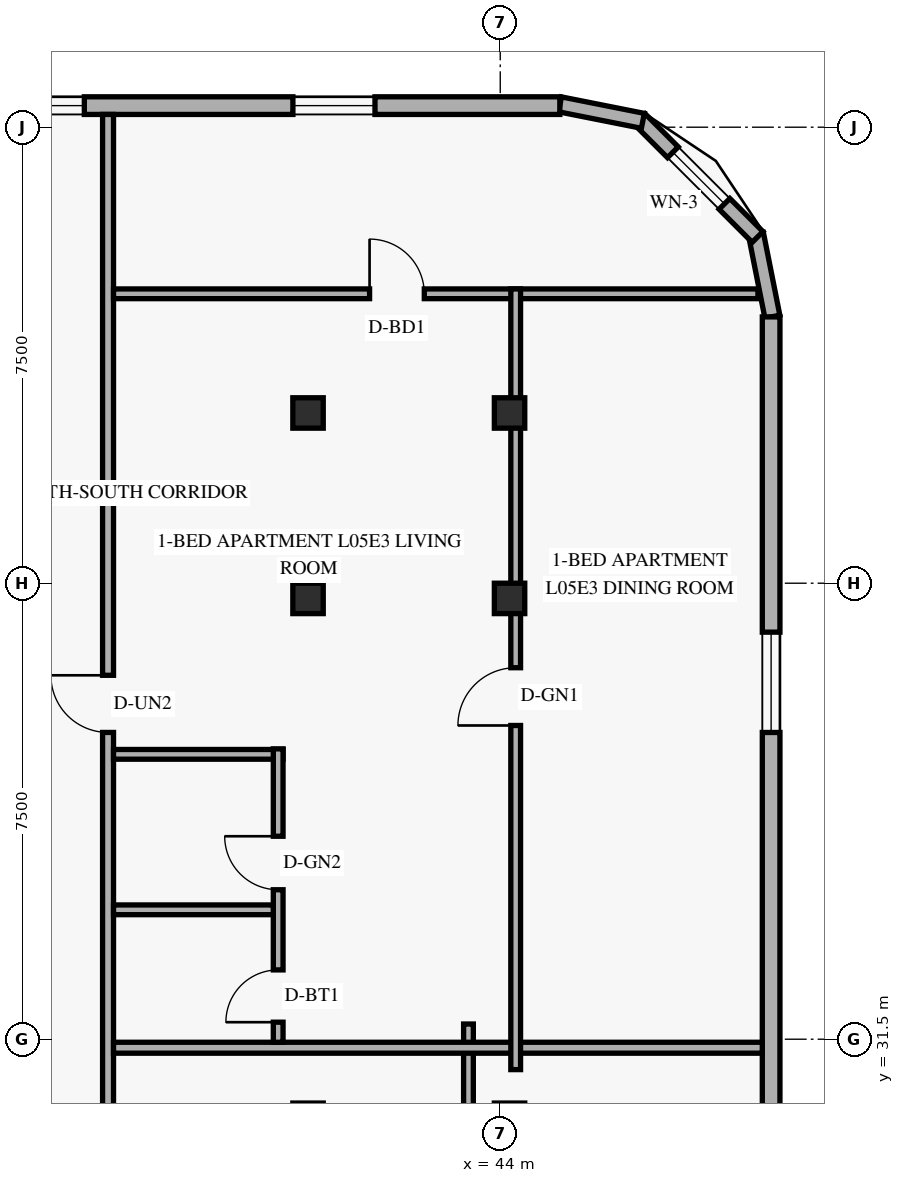
"""IFC4 building model, lengths in metres.
Left out: names, types, materials, properties, quantities, classifications, styles, units other than length and angle.
Written with IfcOpenShell. Run it as: python <this file> out.ifc"""

import sys

from ifc_helpers import new_model, si_unit, direction, frame, frame_2d, origin, origin_2d, place, context, subcontext, project, spatial, rectangle, hollow_rectangle, extrude, element, fill, save


model = new_model("IFC4")
c1 = context("Model", 3, precision=1e-05, world=origin(), true_north=direction((0.0, 1.0)))
c2 = subcontext(c1, "Body", "Model", "MODEL_VIEW")
j1 = project(units=[si_unit("LENGTHUNIT", "METRE"), si_unit("PLANEANGLEUNIT", "RADIAN")], contexts=[c1])
p1 = place(None, origin())
s1 = spatial("IfcSite", under=j1, at=p1, CompositionType="ELEMENT")
p2 = place(p1, origin())
s2 = spatial("IfcBuilding", under=s1, at=p2, CompositionType="ELEMENT")
p3 = place(p2, frame((0.0, 0.0, 24.0)))
s3 = spatial("IfcBuildingStorey", under=s2, at=p3, CompositionType="ELEMENT", Elevation=24.0)
for number, where, z_axis, x_axis in (
    (1, (40.776, 38.75, 0.0), (0.035, 0.0, 0.999), (0.0, 1.0, 0.0)),
    (2, (40.776, 41.8, 0.0), (0.035, 0.0, 0.999), (0.0, 1.0, 0.0)),
):
    element("IfcColumn", number, at=place(p3, frame(where, z_axis=z_axis, x_axis=x_axis)), inside=s3, PredefinedType="COLUMN", context=c2, shape_type="SweptSolid", body=[
        extrude(hollow_rectangle(XDim=0.5, YDim=0.5, WallThickness=0.022, at=origin_2d()), origin(), (0.0, 0.0, 1.0), 3.602),
    ])
for number, where, z_axis, x_axis in (
    (3, (44.049, 38.75, 0.0), (0.058, 0.0, 0.998), (0.0, 1.0, 0.0)),
    (4, (44.049, 41.8, 0.0), (0.058, 0.0, 0.998), (0.0, 1.0, 0.0)),
):
    element("IfcColumn", number, at=place(p3, frame(where, z_axis=z_axis, x_axis=x_axis)), inside=s3, PredefinedType="COLUMN", context=c2, shape_type="SweptSolid", body=[
        extrude(hollow_rectangle(XDim=0.5, YDim=0.5, WallThickness=0.022, at=origin_2d()), origin(), (0.0, 0.0, 1.0), 3.606),
    ])
p4 = place(p3, frame((48.476, 43.384, 0.0), z_axis=(0.0, 0.0, 1.0), x_axis=(-0.19496651342, 0.980809899341, 0.0)))
e5 = element("IfcWall", 5, at=p4, inside=s3, PredefinedType="SOLIDWALL", context=c2, shape_type="SweptSolid", body=[
    extrude(rectangle(XDim=1.389, YDim=0.25, at=frame_2d((0.694, 0.0))), origin(), (0.0, 0.0, 1.0), 3.36),
])
p5 = place(p3, frame((48.232, 44.695, 0.0), z_axis=(0.0, 0.0, 1.0), x_axis=(-0.707106781187, 0.707106781187, 0.0)))
e6 = element("IfcWall", 6, at=p5, inside=s3, PredefinedType="SOLIDWALL", context=c2, shape_type="SweptSolid", body=[
    extrude(rectangle(XDim=2.739, YDim=0.25, at=frame_2d((1.37, 0.0))), origin(), (0.0, 0.0, 1.0), 3.36),
])
p6 = place(p5, frame((0.77, 0.0, 0.85)))
e7 = element("IfcOpeningElement", 7, at=p6, cuts=e6, PredefinedType="OPENING", context=c2, shape_type="SweptSolid", body=[
    extrude(rectangle(XDim=1.2, YDim=1.5, at=frame_2d((0.6, 0.75))), frame((0.0, 0.135, 0.0), z_axis=(0.0, -1.0, 0.0), x_axis=(1.0, 0.0, 0.0)), (0.0, 0.0, 1.0), 0.27),
])
p7 = place(p3, frame((46.345, 46.605, 0.0), z_axis=(0.0, 0.0, 1.0), x_axis=(-0.980809899341, 0.19496651342, 0.0)))
e8 = element("IfcWall", 8, at=p7, inside=s3, PredefinedType="SOLIDWALL", context=c2, shape_type="SweptSolid", body=[
    extrude(rectangle(XDim=1.389, YDim=0.25, at=frame_2d((0.694, 0.0))), origin(), (0.0, 0.0, 1.0), 3.36),
])
p8 = place(p3, frame((48.455, 4.62, 0.0), z_axis=(0.0, 0.0, 1.0), x_axis=(0.0, 1.0, 0.0)))
e9 = element("IfcWall", 9, at=p8, inside=s3, PredefinedType="SOLIDWALL", context=c2, shape_type="SweptSolid", body=[
    extrude(rectangle(XDim=38.76, YDim=0.29, at=frame_2d((19.38, 0.0))), origin(), (0.0, 0.0, 1.0), 3.36),
])
p9 = place(p8, frame((4.725, 0.0, 0.85)))
e10 = element("IfcOpeningElement", 10, at=p9, cuts=e9, PredefinedType="OPENING", context=c2, shape_type="SweptSolid", body=[
    extrude(rectangle(XDim=1.65, YDim=1.6, at=frame_2d((0.825, 0.8))), frame((0.0, 0.155, 0.0), z_axis=(0.0, -1.0, 0.0), x_axis=(1.0, 0.0, 0.0)), (0.0, 0.0, 1.0), 0.31),
])
p10 = place(p8, frame((12.429, 0.0, 0.85)))
e11 = element("IfcOpeningElement", 11, at=p10, cuts=e9, PredefinedType="OPENING", context=c2, shape_type="SweptSolid", body=[
    extrude(rectangle(XDim=1.65, YDim=1.6, at=frame_2d((0.825, 0.8))), frame((0.0, 0.155, 0.0), z_axis=(0.0, -1.0, 0.0), x_axis=(1.0, 0.0, 0.0)), (0.0, 0.0, 1.0), 0.31),
])
p11 = place(p8, frame((18.254, 0.0, 0.85)))
e12 = element("IfcOpeningElement", 12, at=p11, cuts=e9, PredefinedType="OPENING", context=c2, shape_type="SweptSolid", body=[
    extrude(rectangle(XDim=1.65, YDim=1.6, at=frame_2d((0.825, 0.8))), frame((0.0, 0.155, 0.0), z_axis=(0.0, -1.0, 0.0), x_axis=(1.0, 0.0, 0.0)), (0.0, 0.0, 1.0), 0.31),
])
p12 = place(p8, frame((23.92, 0.0, 0.85)))
e13 = element("IfcOpeningElement", 13, at=p12, cuts=e9, PredefinedType="OPENING", context=c2, shape_type="SweptSolid", body=[
    extrude(rectangle(XDim=1.65, YDim=1.6, at=frame_2d((0.825, 0.8))), frame((0.0, 0.155, 0.0), z_axis=(0.0, -1.0, 0.0), x_axis=(1.0, 0.0, 0.0)), (0.0, 0.0, 1.0), 0.31),
])
p13 = place(p8, frame((31.925, 0.0, 0.85)))
e14 = element("IfcOpeningElement", 14, at=p13, cuts=e9, PredefinedType="OPENING", context=c2, shape_type="SweptSolid", body=[
    extrude(rectangle(XDim=1.65, YDim=1.6, at=frame_2d((0.825, 0.8))), frame((0.0, 0.155, 0.0), z_axis=(0.0, -1.0, 0.0), x_axis=(1.0, 0.0, 0.0)), (0.0, 0.0, 1.0), 0.31),
])
p14 = place(p3, frame((44.98, 46.855, 0.0), z_axis=(0.0, 0.0, 1.0), x_axis=(-1.0, 0.0, 0.0)))
e15 = element("IfcWall", 15, at=p14, inside=s3, PredefinedType="SOLIDWALL", context=c2, shape_type="SweptSolid", body=[
    extrude(rectangle(XDim=39.56, YDim=0.29, at=frame_2d((19.78, 0.0))), origin(), (0.0, 0.0, 1.0), 3.36),
])
p15 = place(p14, frame((35.445, 0.0, 0.85)))
e16 = element("IfcOpeningElement", 16, at=p15, cuts=e15, PredefinedType="OPENING", context=c2, shape_type="SweptSolid", body=[
    extrude(rectangle(XDim=1.35, YDim=1.55, at=frame_2d((0.675, 0.775))), frame((0.0, 0.155, 0.0), z_axis=(0.0, -1.0, 0.0), x_axis=(1.0, 0.0, 0.0)), (0.0, 0.0, 1.0), 0.31),
])
p16 = place(p14, frame((31.18, 0.0, 0.85)))
e17 = element("IfcOpeningElement", 17, at=p16, cuts=e15, PredefinedType="OPENING", context=c2, shape_type="SweptSolid", body=[
    extrude(rectangle(XDim=1.2, YDim=1.5, at=frame_2d((0.6, 0.75))), frame((0.0, 0.155, 0.0), z_axis=(0.0, -1.0, 0.0), x_axis=(1.0, 0.0, 0.0)), (0.0, 0.0, 1.0), 0.31),
])
p17 = place(p14, frame((26.85, 0.0, 0.85)))
e18 = element("IfcOpeningElement", 18, at=p17, cuts=e15, PredefinedType="OPENING", context=c2, shape_type="SweptSolid", body=[
    extrude(rectangle(XDim=1.35, YDim=1.55, at=frame_2d((0.675, 0.775))), frame((0.0, 0.155, 0.0), z_axis=(0.0, -1.0, 0.0), x_axis=(1.0, 0.0, 0.0)), (0.0, 0.0, 1.0), 0.31),
])
p18 = place(p14, frame((21.425, 0.0, 0.85)))
e19 = element("IfcOpeningElement", 19, at=p18, cuts=e15, PredefinedType="OPENING", context=c2, shape_type="SweptSolid", body=[
    extrude(rectangle(XDim=1.35, YDim=1.55, at=frame_2d((0.675, 0.775))), frame((0.0, 0.155, 0.0), z_axis=(0.0, -1.0, 0.0), x_axis=(1.0, 0.0, 0.0)), (0.0, 0.0, 1.0), 0.31),
])
p19 = place(p14, frame((16.19, 0.0, 0.85)))
e20 = element("IfcOpeningElement", 20, at=p19, cuts=e15, PredefinedType="OPENING", context=c2, shape_type="SweptSolid", body=[
    extrude(rectangle(XDim=1.35, YDim=1.55, at=frame_2d((0.675, 0.775))), frame((0.0, 0.155, 0.0), z_axis=(0.0, -1.0, 0.0), x_axis=(1.0, 0.0, 0.0)), (0.0, 0.0, 1.0), 0.31),
])
p20 = place(p14, frame((10.955, 0.0, 0.85)))
e21 = element("IfcOpeningElement", 21, at=p20, cuts=e15, PredefinedType="OPENING", context=c2, shape_type="SweptSolid", body=[
    extrude(rectangle(XDim=1.35, YDim=1.55, at=frame_2d((0.675, 0.775))), frame((0.0, 0.155, 0.0), z_axis=(0.0, -1.0, 0.0), x_axis=(1.0, 0.0, 0.0)), (0.0, 0.0, 1.0), 0.31),
])
p21 = place(p14, frame((7.82, 0.0, 0.85)))
e22 = element("IfcOpeningElement", 22, at=p21, cuts=e15, PredefinedType="OPENING", context=c2, shape_type="SweptSolid", body=[
    extrude(rectangle(XDim=1.35, YDim=1.55, at=frame_2d((0.675, 0.775))), frame((0.0, 0.155, 0.0), z_axis=(0.0, -1.0, 0.0), x_axis=(1.0, 0.0, 0.0)), (0.0, 0.0, 1.0), 0.31),
])
p22 = place(p14, frame((3.04, 0.0, 0.85)))
e23 = element("IfcOpeningElement", 23, at=p22, cuts=e15, PredefinedType="OPENING", context=c2, shape_type="SweptSolid", body=[
    extrude(rectangle(XDim=1.35, YDim=1.55, at=frame_2d((0.675, 0.775))), frame((0.0, 0.155, 0.0), z_axis=(0.0, -1.0, 0.0), x_axis=(1.0, 0.0, 0.0)), (0.0, 0.0, 1.0), 0.31),
])
p23 = place(p3, frame((37.55, 1.29, 0.0), z_axis=(0.0, 0.0, 1.0), x_axis=(0.0, 1.0, 0.0)))
e24 = element("IfcWall", 24, at=p23, inside=s3, PredefinedType="STANDARD", context=c2, shape_type="SweptSolid", body=[
    extrude(rectangle(XDim=45.42, YDim=0.18, at=frame_2d((22.71, 0.0))), origin(), (0.0, 0.0, 1.0), 2.649),
])
p24 = place(p23, frame((8.49, 0.0, 0.0)))
e25 = element("IfcOpeningElement", 25, at=p24, cuts=e24, PredefinedType="OPENING", context=c2, shape_type="SweptSolid", body=[
    extrude(rectangle(XDim=0.94, YDim=2.15, at=frame_2d((0.47, 1.075))), frame((0.0, 0.1, 0.0), z_axis=(0.0, -1.0, 0.0), x_axis=(1.0, 0.0, 0.0)), (0.0, 0.0, 1.0), 0.2),
])
p25 = place(p23, frame((20.073, 0.0, 0.0)))
e26 = element("IfcOpeningElement", 26, at=p25, cuts=e24, PredefinedType="OPENING", context=c2, shape_type="SweptSolid", body=[
    extrude(rectangle(XDim=0.94, YDim=2.15, at=frame_2d((0.47, 1.075))), frame((0.0, 0.1, 0.0), z_axis=(0.0, -1.0, 0.0), x_axis=(1.0, 0.0, 0.0)), (0.0, 0.0, 1.0), 0.2),
])
p26 = place(p23, frame((35.256, 0.0, 0.0)))
e27 = element("IfcOpeningElement", 27, at=p26, cuts=e24, PredefinedType="OPENING", context=c2, shape_type="SweptSolid", body=[
    extrude(rectangle(XDim=0.94, YDim=2.15, at=frame_2d((0.47, 1.075))), frame((0.0, 0.1, 0.0), z_axis=(0.0, -1.0, 0.0), x_axis=(1.0, 0.0, 0.0)), (0.0, 0.0, 1.0), 0.2),
])
p27 = place(p3, frame((43.477, 27.29, 0.0), z_axis=(0.0, 0.0, 1.0), x_axis=(0.0, 1.0, 0.0)))
e28 = element("IfcWall", 28, at=p27, inside=s3, PredefinedType="PARTITIONING", context=c2, shape_type="SweptSolid", body=[
    extrude(rectangle(XDim=4.46, YDim=0.16, at=frame_2d((2.23, 0.0))), origin(), (0.0, 0.0, 1.0), 2.649),
])
p28 = place(p3, frame((37.64, 31.36, 0.0), z_axis=(0.0, 0.0, 1.0), x_axis=(1.0, 0.0, 0.0)))
e29 = element("IfcWall", 29, at=p28, inside=s3, PredefinedType="PARTITIONING", context=c2, shape_type="SweptSolid", body=[
    extrude(rectangle(XDim=10.67, YDim=0.18, at=frame_2d((5.335, 0.0))), origin(), (0.0, 0.0, 1.0), 2.649),
])
p29 = place(p3, frame((37.64, 43.76, 0.0), z_axis=(0.0, 0.0, 1.0), x_axis=(1.0, 0.0, 0.0)))
e30 = element("IfcWall", 30, at=p29, inside=s3, PredefinedType="PARTITIONING", context=c2, shape_type="SweptSolid", body=[
    extrude(rectangle(XDim=10.598, YDim=0.16, at=frame_2d((5.299, 0.0))), origin(), (0.0, 0.0, 1.0), 3.36),
])
p30 = place(p29, frame((4.211, 0.0, 0.0)))
e31 = element("IfcOpeningElement", 31, at=p30, cuts=e30, PredefinedType="OPENING", context=c2, shape_type="SweptSolid", body=[
    extrude(rectangle(XDim=0.9, YDim=2.14, at=frame_2d((0.45, 1.07))), frame((0.0, 0.09, 0.0), z_axis=(0.0, -1.0, 0.0), x_axis=(1.0, 0.0, 0.0)), (0.0, 0.0, 1.0), 0.18),
])
p31 = place(p3, frame((37.64, 36.186, 0.0), z_axis=(0.0, 0.0, 1.0), x_axis=(1.0, 0.0, 0.0)))
e32 = element("IfcWall", 32, at=p31, inside=s3, PredefinedType="PLUMBINGWALL", context=c2, shape_type="SweptSolid", body=[
    extrude(rectangle(XDim=2.788, YDim=0.16, at=frame_2d((1.394, 0.0))), origin(), (0.0, 0.0, 1.0), 3.36),
])
p32 = place(p3, frame((40.348, 31.45, 0.0), z_axis=(0.0, 0.0, 1.0), x_axis=(0.0, 1.0, 0.0)))
e33 = element("IfcWall", 33, at=p32, inside=s3, PredefinedType="PLUMBINGWALL", context=c2, shape_type="SweptSolid", body=[
    extrude(rectangle(XDim=4.825, YDim=0.16, at=frame_2d((2.413, 0.0))), origin(), (0.0, 0.0, 1.0), 2.932),
])
p33 = place(p32, frame((0.33, 0.0, 0.0)))
e34 = element("IfcOpeningElement", 34, at=p33, cuts=e33, PredefinedType="OPENING", context=c2, shape_type="SweptSolid", body=[
    extrude(rectangle(XDim=0.86, YDim=2.12, at=frame_2d((0.43, 1.06))), frame((0.0, 0.09, 0.0), z_axis=(0.0, -1.0, 0.0), x_axis=(1.0, 0.0, 0.0)), (0.0, 0.0, 1.0), 0.18),
])
p34 = place(p32, frame((2.508, 0.0, 0.0)))
e35 = element("IfcOpeningElement", 35, at=p34, cuts=e33, PredefinedType="OPENING", context=c2, shape_type="SweptSolid", body=[
    extrude(rectangle(XDim=0.88, YDim=2.12, at=frame_2d((0.44, 1.06))), frame((0.0, 0.09, 0.0), z_axis=(0.0, -1.0, 0.0), x_axis=(1.0, 0.0, 0.0)), (0.0, 0.0, 1.0), 0.18),
])
p35 = place(p3, frame((37.64, 33.628, 0.0), z_axis=(0.0, 0.0, 1.0), x_axis=(1.0, 0.0, 0.0)))
e36 = element("IfcWall", 36, at=p35, inside=s3, PredefinedType="PLUMBINGWALL", context=c2, shape_type="SweptSolid", body=[
    extrude(rectangle(XDim=2.628, YDim=0.16, at=frame_2d((1.314, 0.0))), origin(), (0.0, 0.0, 1.0), 3.36),
])
p36 = place(p3, frame((44.254, 31.0, 0.0), z_axis=(0.0, 0.0, 1.0), x_axis=(0.0, 1.0, 0.0)))
e37 = element("IfcWall", 37, at=p36, inside=s3, PredefinedType="PARTITIONING", context=c2, shape_type="SweptSolid", body=[
    extrude(rectangle(XDim=12.84, YDim=0.16, at=frame_2d((6.42, 0.0))), origin(), (0.0, 0.0, 1.0), 2.809),
])
p37 = place(p36, frame((5.66, 0.0, 0.0)))
e38 = element("IfcOpeningElement", 38, at=p37, cuts=e37, PredefinedType="OPENING", context=c2, shape_type="SweptSolid", body=[
    extrude(rectangle(XDim=0.95, YDim=2.15, at=frame_2d((0.475, 1.075))), frame((0.0, 0.09, 0.0), z_axis=(0.0, -1.0, 0.0), x_axis=(1.0, 0.0, 0.0)), (0.0, 0.0, 1.0), 0.18),
])
p38 = place(p6, origin())
e39 = element("IfcWindow", 39, at=p38, inside=s3, PartitioningType="SINGLE_PANEL", PredefinedType="WINDOW", context=c2, shape_type="SweptSolid", body=[
    extrude(rectangle(XDim=1.2, YDim=1.5, at=frame_2d((0.6, 0.75))), frame((0.0, 0.03, 0.0), z_axis=(0.0, -1.0, 0.0), x_axis=(1.0, 0.0, 0.0)), (0.0, 0.0, 1.0), 0.06),
])
fill(e7, e39)
p39 = place(p13, origin())
e40 = element("IfcWindow", 40, at=p39, inside=s3, PartitioningType="SINGLE_PANEL", PredefinedType="WINDOW", context=c2, shape_type="SweptSolid", body=[
    extrude(rectangle(XDim=1.65, YDim=1.6, at=frame_2d((0.825, 0.8))), frame((0.0, 0.03, 0.0), z_axis=(0.0, -1.0, 0.0), x_axis=(1.0, 0.0, 0.0)), (0.0, 0.0, 1.0), 0.06),
])
fill(e14, e40)
p40 = place(p21, origin())
e41 = element("IfcWindow", 41, at=p40, inside=s3, PartitioningType="SINGLE_PANEL", PredefinedType="WINDOW", context=c2, shape_type="SweptSolid", body=[
    extrude(rectangle(XDim=1.35, YDim=1.55, at=frame_2d((0.675, 0.775))), frame((0.0, 0.03, 0.0), z_axis=(0.0, -1.0, 0.0), x_axis=(1.0, 0.0, 0.0)), (0.0, 0.0, 1.0), 0.06),
])
fill(e22, e41)
p41 = place(p22, origin())
e42 = element("IfcWindow", 42, at=p41, inside=s3, PartitioningType="SINGLE_PANEL", PredefinedType="WINDOW", context=c2, shape_type="SweptSolid", body=[
    extrude(rectangle(XDim=1.35, YDim=1.55, at=frame_2d((0.675, 0.775))), frame((0.0, 0.03, 0.0), z_axis=(0.0, -1.0, 0.0), x_axis=(1.0, 0.0, 0.0)), (0.0, 0.0, 1.0), 0.06),
])
fill(e23, e42)
p42 = place(p37, origin())
e43 = element("IfcDoor", 43, at=p42, inside=s3, OperationType="SINGLE_SWING_LEFT", PredefinedType="DOOR", context=c2, shape_type="SweptSolid", body=[
    extrude(rectangle(XDim=0.95, YDim=2.15, at=frame_2d((0.475, 1.075))), frame((0.0, 0.025, 0.0), z_axis=(0.0, -1.0, 0.0), x_axis=(1.0, 0.0, 0.0)), (0.0, 0.0, 1.0), 0.05),
])
fill(e38, e43)
p43 = place(p26, origin())
e44 = element("IfcDoor", 44, at=p43, inside=s3, OperationType="SINGLE_SWING_RIGHT", PredefinedType="DOOR", context=c2, shape_type="SweptSolid", body=[
    extrude(rectangle(XDim=0.94, YDim=2.15, at=frame_2d((0.47, 1.075))), frame((0.0, 0.025, 0.0), z_axis=(0.0, -1.0, 0.0), x_axis=(1.0, 0.0, 0.0)), (0.0, 0.0, 1.0), 0.05),
])
fill(e27, e44)
p44 = place(p33, origin())
e45 = element("IfcDoor", 45, at=p44, inside=s3, OperationType="SINGLE_SWING_LEFT", PredefinedType="DOOR", context=c2, shape_type="SweptSolid", body=[
    extrude(rectangle(XDim=0.86, YDim=2.12, at=frame_2d((0.43, 1.06))), frame((0.0, 0.025, 0.0), z_axis=(0.0, -1.0, 0.0), x_axis=(1.0, 0.0, 0.0)), (0.0, 0.0, 1.0), 0.05),
])
fill(e34, e45)
p45 = place(p34, origin())
e46 = element("IfcDoor", 46, at=p45, inside=s3, OperationType="SINGLE_SWING_RIGHT", PredefinedType="DOOR", context=c2, shape_type="SweptSolid", body=[
    extrude(rectangle(XDim=0.88, YDim=2.12, at=frame_2d((0.44, 1.06))), frame((0.0, 0.025, 0.0), z_axis=(0.0, -1.0, 0.0), x_axis=(1.0, 0.0, 0.0)), (0.0, 0.0, 1.0), 0.05),
])
fill(e35, e46)
p46 = place(p30, origin())
e47 = element("IfcDoor", 47, at=p46, inside=s3, OperationType="SINGLE_SWING_LEFT", PredefinedType="DOOR", context=c2, shape_type="SweptSolid", body=[
    extrude(rectangle(XDim=0.9, YDim=2.14, at=frame_2d((0.45, 1.07))), frame((0.0, 0.025, 0.0), z_axis=(0.0, -1.0, 0.0), x_axis=(1.0, 0.0, 0.0)), (0.0, 0.0, 1.0), 0.05),
])
fill(e31, e47)
save(model, sys.argv[1])
